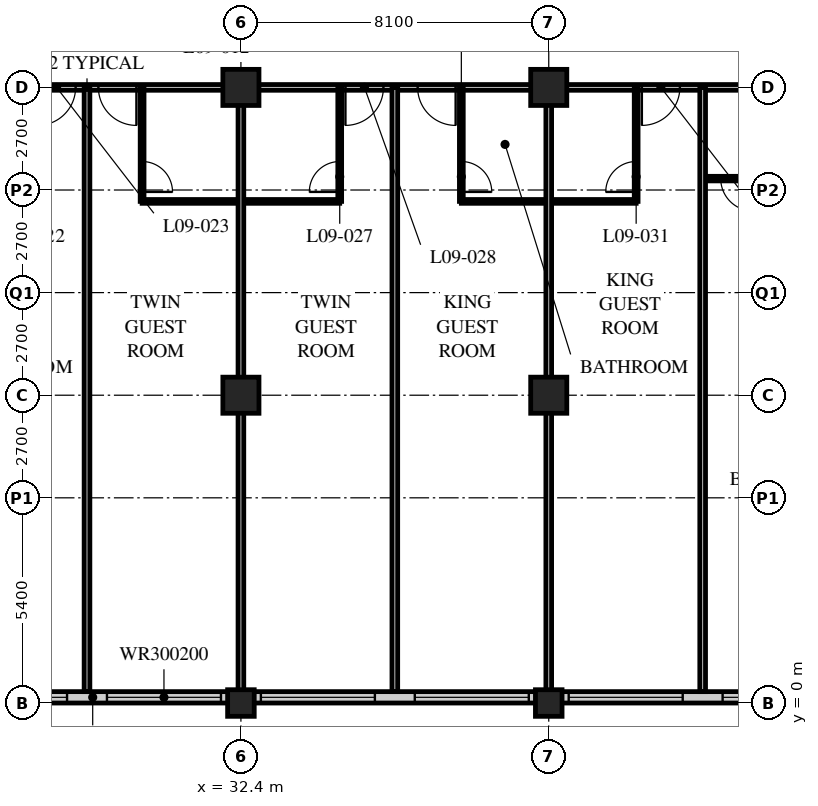
"""IFC4 building model, lengths in metres.
Left out: names, types, materials, properties, quantities, classifications, styles, units other than length and angle.
Written with IfcOpenShell. Run it as: python <this file> out.ifc"""

import sys

from ifc_helpers import new_model, si_unit, direction, frame, frame_2d, origin, origin_2d, place, context, subcontext, project, spatial, rectangle, hollow_rectangle, extrude, element, fill, save


model = new_model("IFC4")
c1 = context("Model", 3, precision=1e-05, world=origin(), true_north=direction((0.0, 1.0)))
c2 = subcontext(c1, "Body", "Model", "MODEL_VIEW")
j1 = project(units=[si_unit("LENGTHUNIT", "METRE"), si_unit("PLANEANGLEUNIT", "RADIAN")], contexts=[c1])
p1 = place(None, origin())
s1 = spatial("IfcSite", under=j1, at=p1, CompositionType="ELEMENT")
p2 = place(p1, origin())
s2 = spatial("IfcBuilding", under=s1, at=p2, CompositionType="ELEMENT")
p3 = place(p2, frame((0.0, 0.0, 43.2)))
s3 = spatial("IfcBuildingStorey", under=s2, at=p3, CompositionType="ELEMENT", Elevation=43.2)
p4 = place(p3, frame((32.4, 0.0, 0.0), z_axis=(0.0, 0.0, 1.0), x_axis=(1.0, 0.0, 0.0)))
e1 = element("IfcColumn", 1, at=p4, inside=s3, PredefinedType="COLUMN", context=c2, shape_type="SweptSolid", body=[
    extrude(hollow_rectangle(XDim=0.7, YDim=0.7, WallThickness=0.06, at=origin_2d()), origin(), (0.0, 0.0, 1.0), 3.4),
])
for number, where, z_axis, x_axis in (
    (2, (32.4, 8.1, 0.0), (0.0, 0.0, 1.0), (1.0, 0.0, 0.0)),
    (3, (32.4, 16.2, 0.0), (0.0, 0.0, 1.0), (1.0, 0.0, 0.0)),
):
    element("IfcColumn", number, at=place(p3, frame(where, z_axis=z_axis, x_axis=x_axis)), inside=s3, PredefinedType="COLUMN", context=c2, shape_type="SweptSolid", body=[
        extrude(hollow_rectangle(XDim=0.95, YDim=0.95, WallThickness=0.095, at=origin_2d()), origin(), (0.0, 0.0, 1.0), 3.4),
    ])
p5 = place(p3, frame((40.5, 0.0, 0.0), z_axis=(0.0, 0.0, 1.0), x_axis=(1.0, 0.0, 0.0)))
e4 = element("IfcColumn", 4, at=p5, inside=s3, PredefinedType="COLUMN", context=c2, shape_type="SweptSolid", body=[
    extrude(hollow_rectangle(XDim=0.7, YDim=0.7, WallThickness=0.06, at=origin_2d()), origin(), (0.0, 0.0, 1.0), 3.4),
])
for number, where, z_axis, x_axis in (
    (5, (40.5, 8.1, 0.0), (0.0, 0.0, 1.0), (1.0, 0.0, 0.0)),
    (6, (40.5, 16.2, 0.0), (0.0, 0.0, 1.0), (1.0, 0.0, 0.0)),
):
    element("IfcColumn", number, at=place(p3, frame(where, z_axis=z_axis, x_axis=x_axis)), inside=s3, PredefinedType="COLUMN", context=c2, shape_type="SweptSolid", body=[
        extrude(hollow_rectangle(XDim=0.95, YDim=0.95, WallThickness=0.095, at=origin_2d()), origin(), (0.0, 0.0, 1.0), 3.4),
    ])
p6 = place(p3, frame((8.4, 0.15, 0.0), z_axis=(0.0, 0.0, 1.0), x_axis=(1.0, 0.0, 0.0)))
e7 = element("IfcWall", 7, at=p6, inside=s3, PredefinedType="SOLIDWALL", context=c2, shape_type="SweptSolid", body=[
    extrude(rectangle(XDim=40.2, YDim=0.3, at=frame_2d((20.1, 0.0))), origin(), (0.0, 0.0, 1.0), 3.19),
])
p7 = place(p6, frame((0.225, 0.0, 0.9)))
e8 = element("IfcOpeningElement", 8, at=p7, cuts=e7, PredefinedType="OPENING", context=c2, shape_type="SweptSolid", body=[
    extrude(rectangle(XDim=3.0, YDim=2.0, at=frame_2d((1.5, 1.0))), frame((0.0, 0.16, 0.0), z_axis=(0.0, -1.0, 0.0), x_axis=(1.0, 0.0, 0.0)), (0.0, 0.0, 1.0), 0.32),
])
p8 = place(p6, frame((4.275, 0.0, 0.9)))
e9 = element("IfcOpeningElement", 9, at=p8, cuts=e7, PredefinedType="OPENING", context=c2, shape_type="SweptSolid", body=[
    extrude(rectangle(XDim=3.0, YDim=2.0, at=frame_2d((1.5, 1.0))), frame((0.0, 0.16, 0.0), z_axis=(0.0, -1.0, 0.0), x_axis=(1.0, 0.0, 0.0)), (0.0, 0.0, 1.0), 0.32),
])
p9 = place(p6, frame((8.325, 0.0, 0.9)))
e10 = element("IfcOpeningElement", 10, at=p9, cuts=e7, PredefinedType="OPENING", context=c2, shape_type="SweptSolid", body=[
    extrude(rectangle(XDim=3.0, YDim=2.0, at=frame_2d((1.5, 1.0))), frame((0.0, 0.16, 0.0), z_axis=(0.0, -1.0, 0.0), x_axis=(1.0, 0.0, 0.0)), (0.0, 0.0, 1.0), 0.32),
])
p10 = place(p6, frame((12.375, 0.0, 0.9)))
e11 = element("IfcOpeningElement", 11, at=p10, cuts=e7, PredefinedType="OPENING", context=c2, shape_type="SweptSolid", body=[
    extrude(rectangle(XDim=3.0, YDim=2.0, at=frame_2d((1.5, 1.0))), frame((0.0, 0.16, 0.0), z_axis=(0.0, -1.0, 0.0), x_axis=(1.0, 0.0, 0.0)), (0.0, 0.0, 1.0), 0.32),
])
p11 = place(p6, frame((16.425, 0.0, 0.9)))
e12 = element("IfcOpeningElement", 12, at=p11, cuts=e7, PredefinedType="OPENING", context=c2, shape_type="SweptSolid", body=[
    extrude(rectangle(XDim=3.0, YDim=2.0, at=frame_2d((1.5, 1.0))), frame((0.0, 0.16, 0.0), z_axis=(0.0, -1.0, 0.0), x_axis=(1.0, 0.0, 0.0)), (0.0, 0.0, 1.0), 0.32),
])
p12 = place(p6, frame((20.475, 0.0, 0.9)))
e13 = element("IfcOpeningElement", 13, at=p12, cuts=e7, PredefinedType="OPENING", context=c2, shape_type="SweptSolid", body=[
    extrude(rectangle(XDim=3.0, YDim=2.0, at=frame_2d((1.5, 1.0))), frame((0.0, 0.16, 0.0), z_axis=(0.0, -1.0, 0.0), x_axis=(1.0, 0.0, 0.0)), (0.0, 0.0, 1.0), 0.32),
])
p13 = place(p6, frame((24.525, 0.0, 0.9)))
e14 = element("IfcOpeningElement", 14, at=p13, cuts=e7, PredefinedType="OPENING", context=c2, shape_type="SweptSolid", body=[
    extrude(rectangle(XDim=3.0, YDim=2.0, at=frame_2d((1.5, 1.0))), frame((0.0, 0.16, 0.0), z_axis=(0.0, -1.0, 0.0), x_axis=(1.0, 0.0, 0.0)), (0.0, 0.0, 1.0), 0.32),
])
p14 = place(p6, frame((28.575, 0.0, 0.9)))
e15 = element("IfcOpeningElement", 15, at=p14, cuts=e7, PredefinedType="OPENING", context=c2, shape_type="SweptSolid", body=[
    extrude(rectangle(XDim=3.0, YDim=2.0, at=frame_2d((1.5, 1.0))), frame((0.0, 0.16, 0.0), z_axis=(0.0, -1.0, 0.0), x_axis=(1.0, 0.0, 0.0)), (0.0, 0.0, 1.0), 0.32),
])
p15 = place(p6, frame((32.625, 0.0, 0.9)))
e16 = element("IfcOpeningElement", 16, at=p15, cuts=e7, PredefinedType="OPENING", context=c2, shape_type="SweptSolid", body=[
    extrude(rectangle(XDim=3.0, YDim=2.0, at=frame_2d((1.5, 1.0))), frame((0.0, 0.16, 0.0), z_axis=(0.0, -1.0, 0.0), x_axis=(1.0, 0.0, 0.0)), (0.0, 0.0, 1.0), 0.32),
])
p16 = place(p6, frame((36.675, 0.0, 0.9)))
e17 = element("IfcOpeningElement", 17, at=p16, cuts=e7, PredefinedType="OPENING", context=c2, shape_type="SweptSolid", body=[
    extrude(rectangle(XDim=3.0, YDim=2.0, at=frame_2d((1.5, 1.0))), frame((0.0, 0.16, 0.0), z_axis=(0.0, -1.0, 0.0), x_axis=(1.0, 0.0, 0.0)), (0.0, 0.0, 1.0), 0.32),
])
p17 = place(p3, frame((8.1, 16.2, 0.0), z_axis=(0.0, 0.0, 1.0), x_axis=(1.0, 0.0, 0.0)))
e18 = element("IfcWall", 18, at=p17, inside=s3, PredefinedType="PARTITIONING", context=c2, shape_type="SweptSolid", body=[
    extrude(rectangle(XDim=40.5, YDim=0.15, at=frame_2d((20.25, 0.0))), origin(), (0.0, 0.0, 1.0), 2.578),
])
p18 = place(p17, frame((4.35, 0.0, 0.0)))
e19 = element("IfcOpeningElement", 19, at=p18, cuts=e18, PredefinedType="OPENING", context=c2, shape_type="SweptSolid", body=[
    extrude(rectangle(XDim=1.0, YDim=2.1, at=frame_2d((0.5, 1.05))), frame((0.0, 0.085, 0.0), z_axis=(0.0, -1.0, 0.0), x_axis=(1.0, 0.0, 0.0)), (0.0, 0.0, 1.0), 0.17),
])
p19 = place(p17, frame((10.85, 0.0, 0.0)))
e20 = element("IfcOpeningElement", 20, at=p19, cuts=e18, PredefinedType="OPENING", context=c2, shape_type="SweptSolid", body=[
    extrude(rectangle(XDim=1.0, YDim=2.1, at=frame_2d((0.5, 1.05))), frame((0.0, 0.085, 0.0), z_axis=(0.0, -1.0, 0.0), x_axis=(1.0, 0.0, 0.0)), (0.0, 0.0, 1.0), 0.17),
])
p20 = place(p17, frame((12.75, 0.0, 0.0)))
e21 = element("IfcOpeningElement", 21, at=p20, cuts=e18, PredefinedType="OPENING", context=c2, shape_type="SweptSolid", body=[
    extrude(rectangle(XDim=1.0, YDim=2.1, at=frame_2d((0.5, 1.05))), frame((0.0, 0.085, 0.0), z_axis=(0.0, -1.0, 0.0), x_axis=(1.0, 0.0, 0.0)), (0.0, 0.0, 1.0), 0.17),
])
p21 = place(p17, frame((18.95, 0.0, 0.0)))
e22 = element("IfcOpeningElement", 22, at=p21, cuts=e18, PredefinedType="OPENING", context=c2, shape_type="SweptSolid", body=[
    extrude(rectangle(XDim=1.0, YDim=2.1, at=frame_2d((0.5, 1.05))), frame((0.0, 0.085, 0.0), z_axis=(0.0, -1.0, 0.0), x_axis=(1.0, 0.0, 0.0)), (0.0, 0.0, 1.0), 0.17),
])
p22 = place(p17, frame((20.55, 0.0, 0.0)))
e23 = element("IfcOpeningElement", 23, at=p22, cuts=e18, PredefinedType="OPENING", context=c2, shape_type="SweptSolid", body=[
    extrude(rectangle(XDim=1.0, YDim=2.1, at=frame_2d((0.5, 1.05))), frame((0.0, 0.085, 0.0), z_axis=(0.0, -1.0, 0.0), x_axis=(1.0, 0.0, 0.0)), (0.0, 0.0, 1.0), 0.17),
])
p23 = place(p17, frame((27.05, 0.0, 0.0)))
e24 = element("IfcOpeningElement", 24, at=p23, cuts=e18, PredefinedType="OPENING", context=c2, shape_type="SweptSolid", body=[
    extrude(rectangle(XDim=1.0, YDim=2.1, at=frame_2d((0.5, 1.05))), frame((0.0, 0.085, 0.0), z_axis=(0.0, -1.0, 0.0), x_axis=(1.0, 0.0, 0.0)), (0.0, 0.0, 1.0), 0.17),
])
p24 = place(p17, frame((28.95, 0.0, 0.0)))
e25 = element("IfcOpeningElement", 25, at=p24, cuts=e18, PredefinedType="OPENING", context=c2, shape_type="SweptSolid", body=[
    extrude(rectangle(XDim=1.0, YDim=2.1, at=frame_2d((0.5, 1.05))), frame((0.0, 0.085, 0.0), z_axis=(0.0, -1.0, 0.0), x_axis=(1.0, 0.0, 0.0)), (0.0, 0.0, 1.0), 0.17),
])
p25 = place(p17, frame((34.85, 0.0, 0.0)))
e26 = element("IfcOpeningElement", 26, at=p25, cuts=e18, PredefinedType="OPENING", context=c2, shape_type="SweptSolid", body=[
    extrude(rectangle(XDim=1.0, YDim=2.1, at=frame_2d((0.5, 1.05))), frame((0.0, 0.085, 0.0), z_axis=(0.0, -1.0, 0.0), x_axis=(1.0, 0.0, 0.0)), (0.0, 0.0, 1.0), 0.17),
])
p26 = place(p17, frame((1.525, 0.0, 0.0)))
e27 = element("IfcOpeningElement", 27, at=p26, cuts=e18, PredefinedType="OPENING", context=c2, shape_type="SweptSolid", body=[
    extrude(rectangle(XDim=1.0, YDim=2.1, at=frame_2d((0.5, 1.05))), frame((0.0, 0.085, 0.0), z_axis=(0.0, -1.0, 0.0), x_axis=(1.0, 0.0, 0.0)), (0.0, 0.0, 1.0), 0.17),
])
p27 = place(p17, frame((37.975, 0.0, 0.0)))
e28 = element("IfcOpeningElement", 28, at=p27, cuts=e18, PredefinedType="OPENING", context=c2, shape_type="SweptSolid", body=[
    extrude(rectangle(XDim=1.0, YDim=2.1, at=frame_2d((0.5, 1.05))), frame((0.0, 0.085, 0.0), z_axis=(0.0, -1.0, 0.0), x_axis=(1.0, 0.0, 0.0)), (0.0, 0.0, 1.0), 0.17),
])
p28 = place(p3, frame((28.35, 16.2, 0.0), z_axis=(0.0, 0.0, 1.0), x_axis=(0.0, -1.0, 0.0)))
e29 = element("IfcWall", 29, at=p28, inside=s3, PredefinedType="PARTITIONING", context=c2, shape_type="SweptSolid", body=[
    extrude(rectangle(XDim=15.9, YDim=0.15, at=frame_2d((7.95, 0.0))), origin(), (0.0, 0.0, 1.0), 3.19),
])
p29 = place(p3, frame((29.8, 13.2, 0.0), z_axis=(0.0, 0.0, 1.0), x_axis=(1.0, 0.0, 0.0)))
e30 = element("IfcWall", 30, at=p29, inside=s3, PredefinedType="PARTITIONING", context=c2, shape_type="SweptSolid", body=[
    extrude(rectangle(XDim=5.2, YDim=0.1, at=frame_2d((2.6, 0.0))), origin(), (0.0, 0.0, 1.0), 3.19),
])
p30 = place(p3, frame((29.8, 16.2, 0.0), z_axis=(0.0, 0.0, 1.0), x_axis=(0.0, -1.0, 0.0)))
e31 = element("IfcWall", 31, at=p30, inside=s3, PredefinedType="PARTITIONING", context=c2, shape_type="SweptSolid", body=[
    extrude(rectangle(XDim=3.0, YDim=0.1, at=frame_2d((1.5, 0.0))), origin(), (0.0, 0.0, 1.0), 3.19),
])
p31 = place(p30, frame((1.95, 0.0, 0.0)))
e32 = element("IfcOpeningElement", 32, at=p31, cuts=e31, PredefinedType="OPENING", context=c2, shape_type="SweptSolid", body=[
    extrude(rectangle(XDim=0.8, YDim=2.1, at=frame_2d((0.4, 1.05))), frame((0.0, 0.06, 0.0), z_axis=(0.0, -1.0, 0.0), x_axis=(1.0, 0.0, 0.0)), (0.0, 0.0, 1.0), 0.12),
])
p32 = place(p3, frame((32.4, 16.2, 0.0), z_axis=(0.0, 0.0, 1.0), x_axis=(0.0, -1.0, 0.0)))
e33 = element("IfcWall", 33, at=p32, inside=s3, PredefinedType="PARTITIONING", context=c2, shape_type="SweptSolid", body=[
    extrude(rectangle(XDim=15.9, YDim=0.15, at=frame_2d((7.95, 0.0))), origin(), (0.0, 0.0, 1.0), 2.578),
])
p33 = place(p3, frame((35.0, 16.2, 0.0), z_axis=(0.0, 0.0, 1.0), x_axis=(0.0, -1.0, 0.0)))
e34 = element("IfcWall", 34, at=p33, inside=s3, PredefinedType="PARTITIONING", context=c2, shape_type="SweptSolid", body=[
    extrude(rectangle(XDim=3.0, YDim=0.1, at=frame_2d((1.5, 0.0))), origin(), (0.0, 0.0, 1.0), 3.19),
])
p34 = place(p33, frame((1.95, 0.0, 0.0)))
e35 = element("IfcOpeningElement", 35, at=p34, cuts=e34, PredefinedType="OPENING", context=c2, shape_type="SweptSolid", body=[
    extrude(rectangle(XDim=0.8, YDim=2.1, at=frame_2d((0.4, 1.05))), frame((0.0, 0.06, 0.0), z_axis=(0.0, -1.0, 0.0), x_axis=(1.0, 0.0, 0.0)), (0.0, 0.0, 1.0), 0.12),
])
p35 = place(p3, frame((36.45, 16.2, 0.0), z_axis=(0.0, 0.0, 1.0), x_axis=(0.0, -1.0, 0.0)))
e36 = element("IfcWall", 36, at=p35, inside=s3, PredefinedType="PARTITIONING", context=c2, shape_type="SweptSolid", body=[
    extrude(rectangle(XDim=15.9, YDim=0.15, at=frame_2d((7.95, 0.0))), origin(), (0.0, 0.0, 1.0), 3.19),
])
p36 = place(p3, frame((38.2, 13.2, 0.0), z_axis=(0.0, 0.0, 1.0), x_axis=(1.0, 0.0, 0.0)))
e37 = element("IfcWall", 37, at=p36, inside=s3, PredefinedType="PARTITIONING", context=c2, shape_type="SweptSolid", body=[
    extrude(rectangle(XDim=4.6, YDim=0.1, at=frame_2d((2.3, 0.0))), origin(), (0.0, 0.0, 1.0), 3.19),
])
p37 = place(p3, frame((38.2, 16.2, 0.0), z_axis=(0.0, 0.0, 1.0), x_axis=(0.0, -1.0, 0.0)))
e38 = element("IfcWall", 38, at=p37, inside=s3, PredefinedType="PARTITIONING", context=c2, shape_type="SweptSolid", body=[
    extrude(rectangle(XDim=3.0, YDim=0.1, at=frame_2d((1.5, 0.0))), origin(), (0.0, 0.0, 1.0), 3.19),
])
p38 = place(p37, frame((1.95, 0.0, 0.0)))
e39 = element("IfcOpeningElement", 39, at=p38, cuts=e38, PredefinedType="OPENING", context=c2, shape_type="SweptSolid", body=[
    extrude(rectangle(XDim=0.8, YDim=2.1, at=frame_2d((0.4, 1.05))), frame((0.0, 0.06, 0.0), z_axis=(0.0, -1.0, 0.0), x_axis=(1.0, 0.0, 0.0)), (0.0, 0.0, 1.0), 0.12),
])
p39 = place(p3, frame((40.5, 16.2, 0.0), z_axis=(0.0, 0.0, 1.0), x_axis=(0.0, -1.0, 0.0)))
e40 = element("IfcWall", 40, at=p39, inside=s3, PredefinedType="PARTITIONING", context=c2, shape_type="SweptSolid", body=[
    extrude(rectangle(XDim=15.9, YDim=0.15, at=frame_2d((7.95, 0.0))), origin(), (0.0, 0.0, 1.0), 2.578),
])
p40 = place(p3, frame((42.8, 16.2, 0.0), z_axis=(0.0, 0.0, 1.0), x_axis=(0.0, -1.0, 0.0)))
e41 = element("IfcWall", 41, at=p40, inside=s3, PredefinedType="PARTITIONING", context=c2, shape_type="SweptSolid", body=[
    extrude(rectangle(XDim=3.0, YDim=0.1, at=frame_2d((1.5, 0.0))), origin(), (0.0, 0.0, 1.0), 3.19),
])
p41 = place(p40, frame((1.95, 0.0, 0.0)))
e42 = element("IfcOpeningElement", 42, at=p41, cuts=e41, PredefinedType="OPENING", context=c2, shape_type="SweptSolid", body=[
    extrude(rectangle(XDim=0.8, YDim=2.1, at=frame_2d((0.4, 1.05))), frame((0.0, 0.06, 0.0), z_axis=(0.0, -1.0, 0.0), x_axis=(1.0, 0.0, 0.0)), (0.0, 0.0, 1.0), 0.12),
])
p42 = place(p3, frame((44.55, 13.8, 0.0), z_axis=(0.0, 0.0, 1.0), x_axis=(1.0, 0.0, 0.0)))
e43 = element("IfcWall", 43, at=p42, inside=s3, PredefinedType="PARTITIONING", context=c2, shape_type="SweptSolid", body=[
    extrude(rectangle(XDim=8.05, YDim=0.12, at=frame_2d((4.025, 0.0))), origin(), (0.0, 0.0, 1.0), 3.19),
])
p43 = place(p42, frame((0.475, 0.0, 0.0)))
e44 = element("IfcOpeningElement", 44, at=p43, cuts=e43, PredefinedType="OPENING", context=c2, shape_type="SweptSolid", body=[
    extrude(rectangle(XDim=0.85, YDim=2.1, at=frame_2d((0.425, 1.05))), frame((0.0, 0.07, 0.0), z_axis=(0.0, -1.0, 0.0), x_axis=(1.0, 0.0, 0.0)), (0.0, 0.0, 1.0), 0.14),
])
p44 = place(p42, frame((4.325, 0.0, 0.0)))
e45 = element("IfcOpeningElement", 45, at=p44, cuts=e43, PredefinedType="OPENING", context=c2, shape_type="SweptSolid", body=[
    extrude(rectangle(XDim=0.85, YDim=2.1, at=frame_2d((0.425, 1.05))), frame((0.0, 0.07, 0.0), z_axis=(0.0, -1.0, 0.0), x_axis=(1.0, 0.0, 0.0)), (0.0, 0.0, 1.0), 0.14),
])
p45 = place(p3, frame((44.55, 16.2, 0.0), z_axis=(0.0, 0.0, 1.0), x_axis=(0.0, -1.0, 0.0)))
e46 = element("IfcWall", 46, at=p45, inside=s3, PredefinedType="PARTITIONING", context=c2, shape_type="SweptSolid", body=[
    extrude(rectangle(XDim=15.9, YDim=0.15, at=frame_2d((7.95, 0.0))), origin(), (0.0, 0.0, 1.0), 3.19),
])
p46 = place(p11, origin())
e47 = element("IfcWindow", 47, at=p46, inside=s3, PartitioningType="SINGLE_PANEL", PredefinedType="WINDOW", context=c2, shape_type="SweptSolid", body=[
    extrude(rectangle(XDim=3.0, YDim=2.0, at=frame_2d((1.5, 1.0))), frame((0.0, 0.03, 0.0), z_axis=(0.0, -1.0, 0.0), x_axis=(1.0, 0.0, 0.0)), (0.0, 0.0, 1.0), 0.06),
])
fill(e12, e47)
p47 = place(p12, origin())
e48 = element("IfcWindow", 48, at=p47, inside=s3, PartitioningType="SINGLE_PANEL", PredefinedType="WINDOW", context=c2, shape_type="SweptSolid", body=[
    extrude(rectangle(XDim=3.0, YDim=2.0, at=frame_2d((1.5, 1.0))), frame((0.0, 0.03, 0.0), z_axis=(0.0, -1.0, 0.0), x_axis=(1.0, 0.0, 0.0)), (0.0, 0.0, 1.0), 0.06),
])
fill(e13, e48)
p48 = place(p13, origin())
e49 = element("IfcWindow", 49, at=p48, inside=s3, PartitioningType="SINGLE_PANEL", PredefinedType="WINDOW", context=c2, shape_type="SweptSolid", body=[
    extrude(rectangle(XDim=3.0, YDim=2.0, at=frame_2d((1.5, 1.0))), frame((0.0, 0.03, 0.0), z_axis=(0.0, -1.0, 0.0), x_axis=(1.0, 0.0, 0.0)), (0.0, 0.0, 1.0), 0.06),
])
fill(e14, e49)
p49 = place(p14, origin())
e50 = element("IfcWindow", 50, at=p49, inside=s3, PartitioningType="SINGLE_PANEL", PredefinedType="WINDOW", context=c2, shape_type="SweptSolid", body=[
    extrude(rectangle(XDim=3.0, YDim=2.0, at=frame_2d((1.5, 1.0))), frame((0.0, 0.03, 0.0), z_axis=(0.0, -1.0, 0.0), x_axis=(1.0, 0.0, 0.0)), (0.0, 0.0, 1.0), 0.06),
])
fill(e15, e50)
p50 = place(p15, origin())
e51 = element("IfcWindow", 51, at=p50, inside=s3, PartitioningType="SINGLE_PANEL", PredefinedType="WINDOW", context=c2, shape_type="SweptSolid", body=[
    extrude(rectangle(XDim=3.0, YDim=2.0, at=frame_2d((1.5, 1.0))), frame((0.0, 0.03, 0.0), z_axis=(0.0, -1.0, 0.0), x_axis=(1.0, 0.0, 0.0)), (0.0, 0.0, 1.0), 0.06),
])
fill(e16, e51)
p51 = place(p16, origin())
e52 = element("IfcWindow", 52, at=p51, inside=s3, PartitioningType="SINGLE_PANEL", PredefinedType="WINDOW", context=c2, shape_type="SweptSolid", body=[
    extrude(rectangle(XDim=3.0, YDim=2.0, at=frame_2d((1.5, 1.0))), frame((0.0, 0.03, 0.0), z_axis=(0.0, -1.0, 0.0), x_axis=(1.0, 0.0, 0.0)), (0.0, 0.0, 1.0), 0.06),
])
fill(e17, e52)
p52 = place(p21, origin())
e53 = element("IfcDoor", 53, at=p52, inside=s3, OperationType="SINGLE_SWING_RIGHT", PredefinedType="DOOR", context=c2, shape_type="SweptSolid", body=[
    extrude(rectangle(XDim=1.0, YDim=2.1, at=frame_2d((0.5, 1.05))), frame((0.0, 0.025, 0.0), z_axis=(0.0, -1.0, 0.0), x_axis=(1.0, 0.0, 0.0)), (0.0, 0.0, 1.0), 0.05),
])
fill(e22, e53)
p53 = place(p31, origin())
e54 = element("IfcDoor", 54, at=p53, inside=s3, OperationType="SINGLE_SWING_RIGHT", PredefinedType="DOOR", context=c2, shape_type="SweptSolid", body=[
    extrude(rectangle(XDim=0.8, YDim=2.1, at=frame_2d((0.4, 1.05))), frame((0.0, 0.025, 0.0), z_axis=(0.0, -1.0, 0.0), x_axis=(1.0, 0.0, 0.0)), (0.0, 0.0, 1.0), 0.05),
])
fill(e32, e54)
p54 = place(p22, origin())
e55 = element("IfcDoor", 55, at=p54, inside=s3, OperationType="SINGLE_SWING_LEFT", PredefinedType="DOOR", context=c2, shape_type="SweptSolid", body=[
    extrude(rectangle(XDim=1.0, YDim=2.1, at=frame_2d((0.5, 1.05))), frame((0.0, 0.025, 0.0), z_axis=(0.0, -1.0, 0.0), x_axis=(1.0, 0.0, 0.0)), (0.0, 0.0, 1.0), 0.05),
])
fill(e23, e55)
p55 = place(p34, origin())
e56 = element("IfcDoor", 56, at=p55, inside=s3, OperationType="SINGLE_SWING_LEFT", PredefinedType="DOOR", context=c2, shape_type="SweptSolid", body=[
    extrude(rectangle(XDim=0.8, YDim=2.1, at=frame_2d((0.4, 1.05))), frame((0.0, 0.025, 0.0), z_axis=(0.0, -1.0, 0.0), x_axis=(1.0, 0.0, 0.0)), (0.0, 0.0, 1.0), 0.05),
])
fill(e35, e56)
p56 = place(p23, origin())
e57 = element("IfcDoor", 57, at=p56, inside=s3, OperationType="SINGLE_SWING_RIGHT", PredefinedType="DOOR", context=c2, shape_type="SweptSolid", body=[
    extrude(rectangle(XDim=1.0, YDim=2.1, at=frame_2d((0.5, 1.05))), frame((0.0, 0.025, 0.0), z_axis=(0.0, -1.0, 0.0), x_axis=(1.0, 0.0, 0.0)), (0.0, 0.0, 1.0), 0.05),
])
fill(e24, e57)
p57 = place(p38, origin())
e58 = element("IfcDoor", 58, at=p57, inside=s3, OperationType="SINGLE_SWING_RIGHT", PredefinedType="DOOR", context=c2, shape_type="SweptSolid", body=[
    extrude(rectangle(XDim=0.8, YDim=2.1, at=frame_2d((0.4, 1.05))), frame((0.0, 0.025, 0.0), z_axis=(0.0, -1.0, 0.0), x_axis=(1.0, 0.0, 0.0)), (0.0, 0.0, 1.0), 0.05),
])
fill(e39, e58)
p58 = place(p24, origin())
e59 = element("IfcDoor", 59, at=p58, inside=s3, OperationType="SINGLE_SWING_LEFT", PredefinedType="DOOR", context=c2, shape_type="SweptSolid", body=[
    extrude(rectangle(XDim=1.0, YDim=2.1, at=frame_2d((0.5, 1.05))), frame((0.0, 0.025, 0.0), z_axis=(0.0, -1.0, 0.0), x_axis=(1.0, 0.0, 0.0)), (0.0, 0.0, 1.0), 0.05),
])
fill(e25, e59)
p59 = place(p41, origin())
e60 = element("IfcDoor", 60, at=p59, inside=s3, OperationType="SINGLE_SWING_LEFT", PredefinedType="DOOR", context=c2, shape_type="SweptSolid", body=[
    extrude(rectangle(XDim=0.8, YDim=2.1, at=frame_2d((0.4, 1.05))), frame((0.0, 0.025, 0.0), z_axis=(0.0, -1.0, 0.0), x_axis=(1.0, 0.0, 0.0)), (0.0, 0.0, 1.0), 0.05),
])
fill(e42, e60)
p60 = place(p25, origin())
e61 = element("IfcDoor", 61, at=p60, inside=s3, OperationType="SINGLE_SWING_RIGHT", PredefinedType="DOOR", context=c2, shape_type="SweptSolid", body=[
    extrude(rectangle(XDim=1.0, YDim=2.1, at=frame_2d((0.5, 1.05))), frame((0.0, 0.025, 0.0), z_axis=(0.0, -1.0, 0.0), x_axis=(1.0, 0.0, 0.0)), (0.0, 0.0, 1.0), 0.05),
])
fill(e26, e61)
p61 = place(p43, origin())
e62 = element("IfcDoor", 62, at=p61, inside=s3, OperationType="SINGLE_SWING_LEFT", PredefinedType="DOOR", context=c2, shape_type="SweptSolid", body=[
    extrude(rectangle(XDim=0.85, YDim=2.1, at=frame_2d((0.425, 1.05))), frame((0.0, 0.025, 0.0), z_axis=(0.0, -1.0, 0.0), x_axis=(1.0, 0.0, 0.0)), (0.0, 0.0, 1.0), 0.05),
])
fill(e44, e62)
save(model, sys.argv[1])
